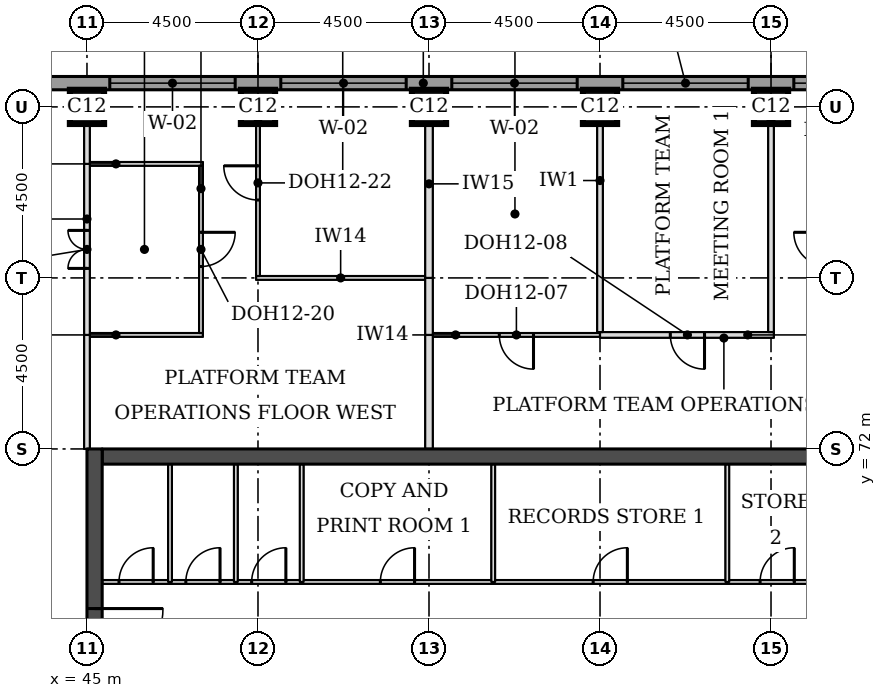
"""IFC4 building model, lengths in metres.
Left out: names, types, materials, properties, quantities, classifications, styles, units other than length and angle.
Written with IfcOpenShell. Run it as: python <this file> out.ifc"""

import sys

from ifc_helpers import new_model, si_unit, direction, frame, frame_2d, origin, origin_2d, place, context, subcontext, project, spatial, rectangle, extrude, element, fill, save


model = new_model("IFC4")
c1 = context("Model", 3, precision=1e-05, world=origin(), true_north=direction((0.0, 1.0)))
c2 = subcontext(c1, "Body", "Model", "MODEL_VIEW")
j1 = project(units=[si_unit("LENGTHUNIT", "METRE"), si_unit("PLANEANGLEUNIT", "RADIAN")], contexts=[c1])
p1 = place(None, origin())
s1 = spatial("IfcSite", under=j1, at=p1, CompositionType="ELEMENT")
p2 = place(p1, origin())
s2 = spatial("IfcBuilding", under=s1, at=p2, CompositionType="ELEMENT")
p3 = place(p2, frame((0.0, 0.0, 245.2)))
s3 = spatial("IfcBuildingStorey", under=s2, at=p3, CompositionType="ELEMENT", Elevation=245.2)
for number, where, z_axis, x_axis in (
    (1, (45.0, 81.0, 0.0), (0.0, 0.0, 1.0), (1.0, 0.0, 0.0)),
    (2, (49.5, 81.0, 0.0), (0.0, 0.0, 1.0), (1.0, 0.0, 0.0)),
    (3, (54.0, 81.0, 0.0), (0.0, 0.0, 1.0), (1.0, 0.0, 0.0)),
    (4, (58.5, 81.0, 0.0), (0.0, 0.0, 1.0), (1.0, 0.0, 0.0)),
    (5, (63.0, 81.0, 0.0), (0.0, 0.0, 1.0), (1.0, 0.0, 0.0)),
):
    element("IfcColumn", number, at=place(p3, frame(where, z_axis=z_axis, x_axis=x_axis)), inside=s3, PredefinedType="COLUMN", context=c2, shape_type="SweptSolid", body=[
        extrude(rectangle(XDim=0.9, YDim=0.9, at=origin_2d()), origin(), (0.0, 0.0, 1.0), 3.7),
    ])
p4 = place(p3, frame((45.4, 71.8, 0.0), z_axis=(0.0, 0.0, 1.0), x_axis=(1.0, 0.0, 0.0)))
e6 = element("IfcWall", 6, at=p4, inside=s3, PredefinedType="SHEAR", context=c2, shape_type="SweptSolid", body=[
    extrude(rectangle(XDim=21.7, YDim=0.4, at=frame_2d((10.85, 0.0))), origin(), (0.0, 0.0, 1.0), 3.7),
])
p5 = place(p3, frame((45.2, 49.5, 0.0), z_axis=(0.0, 0.0, 1.0), x_axis=(0.0, 1.0, 0.0)))
e7 = element("IfcWall", 7, at=p5, inside=s3, PredefinedType="SHEAR", context=c2, shape_type="SweptSolid", body=[
    extrude(rectangle(XDim=22.5, YDim=0.4, at=frame_2d((11.25, 0.0))), origin(), (0.0, 0.0, 1.0), 3.7),
])
p6 = place(p5, frame((4.2, 0.0, 0.0)))
e8 = element("IfcOpeningElement", 8, at=p6, cuts=e7, PredefinedType="OPENING", context=c2, shape_type="SweptSolid", body=[
    extrude(rectangle(XDim=1.8, YDim=2.1, at=frame_2d((0.9, 1.05))), frame((0.0, 0.21, 0.0), z_axis=(0.0, -1.0, 0.0), x_axis=(1.0, 0.0, 0.0)), (0.0, 0.0, 1.0), 0.42),
])
p7 = place(p5, frame((6.9, 0.0, 0.0)))
e9 = element("IfcOpeningElement", 9, at=p7, cuts=e7, PredefinedType="OPENING", context=c2, shape_type="SweptSolid", body=[
    extrude(rectangle(XDim=1.1, YDim=2.1, at=frame_2d((0.55, 1.05))), frame((0.0, 0.21, 0.0), z_axis=(0.0, -1.0, 0.0), x_axis=(1.0, 0.0, 0.0)), (0.0, 0.0, 1.0), 0.42),
])
p8 = place(p5, frame((13.6, 0.0, 0.0)))
e10 = element("IfcOpeningElement", 10, at=p8, cuts=e7, PredefinedType="OPENING", context=c2, shape_type="SweptSolid", body=[
    extrude(rectangle(XDim=1.1, YDim=2.1, at=frame_2d((0.55, 1.05))), frame((0.0, 0.21, 0.0), z_axis=(0.0, -1.0, 0.0), x_axis=(1.0, 0.0, 0.0)), (0.0, 0.0, 1.0), 0.42),
])
p9 = place(p5, frame((16.5, 0.0, 0.0)))
e11 = element("IfcOpeningElement", 11, at=p9, cuts=e7, PredefinedType="OPENING", context=c2, shape_type="SweptSolid", body=[
    extrude(rectangle(XDim=1.8, YDim=2.1, at=frame_2d((0.9, 1.05))), frame((0.0, 0.21, 0.0), z_axis=(0.0, -1.0, 0.0), x_axis=(1.0, 0.0, 0.0)), (0.0, 0.0, 1.0), 0.42),
])
p10 = place(p3, frame((72.331, 81.625, 0.0), z_axis=(0.0, 0.0, 1.0), x_axis=(-1.0, 0.0, 0.0)))
e12 = element("IfcWall", 12, at=p10, inside=s3, PredefinedType="STANDARD", context=c2, shape_type="SweptSolid", body=[
    extrude(rectangle(XDim=32.163, YDim=0.35, at=frame_2d((16.081, 0.0))), origin(), (0.0, 0.0, 1.0), 3.525),
])
p11 = place(p10, frame((5.431, 0.0, 0.9)))
e13 = element("IfcOpeningElement", 13, at=p11, cuts=e12, PredefinedType="OPENING", context=c2, shape_type="SweptSolid", body=[
    extrude(rectangle(XDim=3.3, YDim=1.9, at=frame_2d((1.65, 0.95))), frame((0.0, 0.185, 0.0), z_axis=(0.0, -1.0, 0.0), x_axis=(1.0, 0.0, 0.0)), (0.0, 0.0, 1.0), 0.37),
])
p12 = place(p10, frame((9.931, 0.0, 0.9)))
e14 = element("IfcOpeningElement", 14, at=p12, cuts=e12, PredefinedType="OPENING", context=c2, shape_type="SweptSolid", body=[
    extrude(rectangle(XDim=3.3, YDim=1.9, at=frame_2d((1.65, 0.95))), frame((0.0, 0.185, 0.0), z_axis=(0.0, -1.0, 0.0), x_axis=(1.0, 0.0, 0.0)), (0.0, 0.0, 1.0), 0.37),
])
p13 = place(p10, frame((14.431, 0.0, 0.9)))
e15 = element("IfcOpeningElement", 15, at=p13, cuts=e12, PredefinedType="OPENING", context=c2, shape_type="SweptSolid", body=[
    extrude(rectangle(XDim=3.3, YDim=1.9, at=frame_2d((1.65, 0.95))), frame((0.0, 0.185, 0.0), z_axis=(0.0, -1.0, 0.0), x_axis=(1.0, 0.0, 0.0)), (0.0, 0.0, 1.0), 0.37),
])
p14 = place(p10, frame((18.931, 0.0, 0.9)))
e16 = element("IfcOpeningElement", 16, at=p14, cuts=e12, PredefinedType="OPENING", context=c2, shape_type="SweptSolid", body=[
    extrude(rectangle(XDim=3.3, YDim=1.9, at=frame_2d((1.65, 0.95))), frame((0.0, 0.185, 0.0), z_axis=(0.0, -1.0, 0.0), x_axis=(1.0, 0.0, 0.0)), (0.0, 0.0, 1.0), 0.37),
])
p15 = place(p10, frame((23.431, 0.0, 0.9)))
e17 = element("IfcOpeningElement", 17, at=p15, cuts=e12, PredefinedType="OPENING", context=c2, shape_type="SweptSolid", body=[
    extrude(rectangle(XDim=3.3, YDim=1.9, at=frame_2d((1.65, 0.95))), frame((0.0, 0.185, 0.0), z_axis=(0.0, -1.0, 0.0), x_axis=(1.0, 0.0, 0.0)), (0.0, 0.0, 1.0), 0.37),
])
p16 = place(p3, frame((45.075, 75.0, 0.0), z_axis=(0.0, 0.0, 1.0), x_axis=(1.0, 0.0, 0.0)))
e18 = element("IfcWall", 18, at=p16, inside=s3, PredefinedType="PARTITIONING", context=c2, shape_type="SweptSolid", body=[
    extrude(rectangle(XDim=2.975, YDim=0.1, at=frame_2d((1.488, 0.0))), origin(), (0.0, 0.0, 1.0), 3.55),
])
p17 = place(p3, frame((54.1, 75.0, 0.0), z_axis=(0.0, 0.0, 1.0), x_axis=(1.0, 0.0, 0.0)))
e19 = element("IfcWall", 19, at=p17, inside=s3, PredefinedType="PARTITIONING", context=c2, shape_type="SweptSolid", body=[
    extrude(rectangle(XDim=4.4, YDim=0.1, at=frame_2d((2.2, 0.0))), origin(), (0.0, 0.0, 1.0), 3.55),
])
p18 = place(p17, frame((1.75, 0.0, 0.0)))
e20 = element("IfcOpeningElement", 20, at=p18, cuts=e19, PredefinedType="OPENING", context=c2, shape_type="SweptSolid", body=[
    extrude(rectangle(XDim=0.9, YDim=2.1, at=frame_2d((0.45, 1.05))), frame((0.0, 0.06, 0.0), z_axis=(0.0, -1.0, 0.0), x_axis=(1.0, 0.0, 0.0)), (0.0, 0.0, 1.0), 0.12),
])
p19 = place(p3, frame((58.5, 75.0, 0.0), z_axis=(0.0, 0.0, 1.0), x_axis=(1.0, 0.0, 0.0)))
e21 = element("IfcWall", 21, at=p19, inside=s3, PredefinedType="PARTITIONING", context=c2, shape_type="SweptSolid", body=[
    extrude(rectangle(XDim=4.575, YDim=0.15, at=frame_2d((2.288, 0.0))), origin(), (0.0, 0.0, 1.0), 3.55),
])
p20 = place(p19, frame((1.85, 0.0, 0.0)))
e22 = element("IfcOpeningElement", 22, at=p20, cuts=e21, PredefinedType="OPENING", context=c2, shape_type="SweptSolid", body=[
    extrude(rectangle(XDim=0.9, YDim=2.1, at=frame_2d((0.45, 1.05))), frame((0.0, 0.085, 0.0), z_axis=(0.0, -1.0, 0.0), x_axis=(1.0, 0.0, 0.0)), (0.0, 0.0, 1.0), 0.17),
])
p21 = place(p3, frame((49.45, 76.5, 0.0), z_axis=(0.0, 0.0, 1.0), x_axis=(1.0, 0.0, 0.0)))
e23 = element("IfcWall", 23, at=p21, inside=s3, PredefinedType="PARTITIONING", context=c2, shape_type="SweptSolid", body=[
    extrude(rectangle(XDim=4.45, YDim=0.1, at=frame_2d((2.225, 0.0))), origin(), (0.0, 0.0, 1.0), 3.55),
])
p22 = place(p3, frame((45.075, 79.5, 0.0), z_axis=(0.0, 0.0, 1.0), x_axis=(1.0, 0.0, 0.0)))
e24 = element("IfcWall", 24, at=p22, inside=s3, PredefinedType="PARTITIONING", context=c2, shape_type="SweptSolid", body=[
    extrude(rectangle(XDim=2.975, YDim=0.1, at=frame_2d((1.488, 0.0))), origin(), (0.0, 0.0, 1.0), 3.55),
])
p23 = place(p3, frame((45.0, 72.0, 0.0), z_axis=(0.0, 0.0, 1.0), x_axis=(0.0, 1.0, 0.0)))
e25 = element("IfcWall", 25, at=p23, inside=s3, PredefinedType="PARTITIONING", context=c2, shape_type="SweptSolid", body=[
    extrude(rectangle(XDim=3.0, YDim=0.15, at=frame_2d((1.5, 0.0))), origin(), (0.0, 0.0, 1.0), 3.022),
])
p24 = place(p3, frame((54.0, 72.0, 0.0), z_axis=(0.0, 0.0, 1.0), x_axis=(0.0, 1.0, 0.0)))
e26 = element("IfcWall", 26, at=p24, inside=s3, PredefinedType="PARTITIONING", context=c2, shape_type="SweptSolid", body=[
    extrude(rectangle(XDim=3.0, YDim=0.2, at=frame_2d((1.5, 0.0))), origin(), (0.0, 0.0, 1.0), 3.55),
])
p25 = place(p3, frame((45.0, 75.0, 0.0), z_axis=(0.0, 0.0, 1.0), x_axis=(0.0, 1.0, 0.0)))
e27 = element("IfcWall", 27, at=p25, inside=s3, PredefinedType="PARTITIONING", context=c2, shape_type="SweptSolid", body=[
    extrude(rectangle(XDim=4.5, YDim=0.15, at=frame_2d((2.25, 0.0))), origin(), (0.0, 0.0, 1.0), 3.022),
])
p26 = place(p25, frame((1.75, 0.0, 0.0)))
e28 = element("IfcOpeningElement", 28, at=p26, cuts=e27, PredefinedType="OPENING", context=c2, shape_type="SweptSolid", body=[
    extrude(rectangle(XDim=1.0, YDim=2.1, at=frame_2d((0.5, 1.05))), frame((0.0, 0.085, 0.0), z_axis=(0.0, -1.0, 0.0), x_axis=(1.0, 0.0, 0.0)), (0.0, 0.0, 1.0), 0.17),
])
p27 = place(p3, frame((54.0, 75.0, 0.0), z_axis=(0.0, 0.0, 1.0), x_axis=(0.0, 1.0, 0.0)))
e29 = element("IfcWall", 29, at=p27, inside=s3, PredefinedType="PARTITIONING", context=c2, shape_type="SweptSolid", body=[
    extrude(rectangle(XDim=1.5, YDim=0.2, at=frame_2d((0.75, 0.0))), origin(), (0.0, 0.0, 1.0), 3.55),
])
p28 = place(p3, frame((48.0, 75.05, 0.0), z_axis=(0.0, 0.0, 1.0), x_axis=(0.0, 1.0, 0.0)))
e30 = element("IfcWall", 30, at=p28, inside=s3, PredefinedType="PARTITIONING", context=c2, shape_type="SweptSolid", body=[
    extrude(rectangle(XDim=4.4, YDim=0.1, at=frame_2d((2.2, 0.0))), origin(), (0.0, 0.0, 1.0), 3.55),
])
p29 = place(p28, frame((1.75, 0.0, 0.0)))
e31 = element("IfcOpeningElement", 31, at=p29, cuts=e30, PredefinedType="OPENING", context=c2, shape_type="SweptSolid", body=[
    extrude(rectangle(XDim=0.9, YDim=2.1, at=frame_2d((0.45, 1.05))), frame((0.0, 0.06, 0.0), z_axis=(0.0, -1.0, 0.0), x_axis=(1.0, 0.0, 0.0)), (0.0, 0.0, 1.0), 0.12),
])
for number, where, z_axis, x_axis in (
    (32, (58.5, 75.075, 0.0), (0.0, 0.0, 1.0), (0.0, 1.0, 0.0)),
    (33, (63.0, 75.075, 0.0), (0.0, 0.0, 1.0), (0.0, 1.0, 0.0)),
):
    element("IfcWall", number, at=place(p3, frame(where, z_axis=z_axis, x_axis=x_axis)), inside=s3, PredefinedType="PARTITIONING", context=c2, shape_type="SweptSolid", body=[
        extrude(rectangle(XDim=6.375, YDim=0.15, at=frame_2d((3.188, 0.0))), origin(), (0.0, 0.0, 1.0), 3.55),
    ])
p30 = place(p3, frame((54.0, 76.5, 0.0), z_axis=(0.0, 0.0, 1.0), x_axis=(0.0, 1.0, 0.0)))
e34 = element("IfcWall", 34, at=p30, inside=s3, PredefinedType="PARTITIONING", context=c2, shape_type="SweptSolid", body=[
    extrude(rectangle(XDim=4.95, YDim=0.2, at=frame_2d((2.475, 0.0))), origin(), (0.0, 0.0, 1.0), 3.55),
])
p31 = place(p3, frame((49.5, 76.55, 0.0), z_axis=(0.0, 0.0, 1.0), x_axis=(0.0, 1.0, 0.0)))
e35 = element("IfcWall", 35, at=p31, inside=s3, PredefinedType="PARTITIONING", context=c2, shape_type="SweptSolid", body=[
    extrude(rectangle(XDim=4.9, YDim=0.1, at=frame_2d((2.45, 0.0))), origin(), (0.0, 0.0, 1.0), 3.55),
])
p32 = place(p31, frame((2.0, 0.0, 0.0)))
e36 = element("IfcOpeningElement", 36, at=p32, cuts=e35, PredefinedType="OPENING", context=c2, shape_type="SweptSolid", body=[
    extrude(rectangle(XDim=0.9, YDim=2.1, at=frame_2d((0.45, 1.05))), frame((0.0, 0.06, 0.0), z_axis=(0.0, -1.0, 0.0), x_axis=(1.0, 0.0, 0.0)), (0.0, 0.0, 1.0), 0.12),
])
p33 = place(p3, frame((45.0, 79.5, 0.0), z_axis=(0.0, 0.0, 1.0), x_axis=(0.0, 1.0, 0.0)))
e37 = element("IfcWall", 37, at=p33, inside=s3, PredefinedType="PARTITIONING", context=c2, shape_type="SweptSolid", body=[
    extrude(rectangle(XDim=1.95, YDim=0.15, at=frame_2d((0.975, 0.0))), origin(), (0.0, 0.0, 1.0), 3.022),
])
p34 = place(p3, frame((45.4, 68.5, 0.0), z_axis=(0.0, 0.0, 1.0), x_axis=(1.0, 0.0, 0.0)))
e38 = element("IfcWall", 38, at=p34, inside=s3, PredefinedType="PARTITIONING", context=c2, shape_type="SweptSolid", body=[
    extrude(rectangle(XDim=21.7, YDim=0.1, at=frame_2d((10.85, 0.0))), origin(), (0.0, 0.0, 1.0), 3.55),
])
p35 = place(p34, frame((19.938, 0.0, 0.0)))
e39 = element("IfcOpeningElement", 39, at=p35, cuts=e38, PredefinedType="OPENING", context=c2, shape_type="SweptSolid", body=[
    extrude(rectangle(XDim=0.9, YDim=2.1, at=frame_2d((0.45, 1.05))), frame((0.0, 0.06, 0.0), z_axis=(0.0, -1.0, 0.0), x_axis=(1.0, 0.0, 0.0)), (0.0, 0.0, 1.0), 0.12),
])
p36 = place(p34, frame((17.312, 0.0, 0.0)))
e40 = element("IfcOpeningElement", 40, at=p36, cuts=e38, PredefinedType="OPENING", context=c2, shape_type="SweptSolid", body=[
    extrude(rectangle(XDim=0.9, YDim=2.1, at=frame_2d((0.45, 1.05))), frame((0.0, 0.06, 0.0), z_axis=(0.0, -1.0, 0.0), x_axis=(1.0, 0.0, 0.0)), (0.0, 0.0, 1.0), 0.12),
])
p37 = place(p34, frame((0.442, 0.0, 0.0)))
e41 = element("IfcOpeningElement", 41, at=p37, cuts=e38, PredefinedType="OPENING", context=c2, shape_type="SweptSolid", body=[
    extrude(rectangle(XDim=0.9, YDim=2.1, at=frame_2d((0.45, 1.05))), frame((0.0, 0.06, 0.0), z_axis=(0.0, -1.0, 0.0), x_axis=(1.0, 0.0, 0.0)), (0.0, 0.0, 1.0), 0.12),
])
p38 = place(p34, frame((2.201, 0.0, 0.0)))
e42 = element("IfcOpeningElement", 42, at=p38, cuts=e38, PredefinedType="OPENING", context=c2, shape_type="SweptSolid", body=[
    extrude(rectangle(XDim=0.9, YDim=2.1, at=frame_2d((0.45, 1.05))), frame((0.0, 0.06, 0.0), z_axis=(0.0, -1.0, 0.0), x_axis=(1.0, 0.0, 0.0)), (0.0, 0.0, 1.0), 0.12),
])
p39 = place(p34, frame((3.934, 0.0, 0.0)))
e43 = element("IfcOpeningElement", 43, at=p39, cuts=e38, PredefinedType="OPENING", context=c2, shape_type="SweptSolid", body=[
    extrude(rectangle(XDim=0.9, YDim=2.1, at=frame_2d((0.45, 1.05))), frame((0.0, 0.06, 0.0), z_axis=(0.0, -1.0, 0.0), x_axis=(1.0, 0.0, 0.0)), (0.0, 0.0, 1.0), 0.12),
])
p40 = place(p34, frame((12.92, 0.0, 0.0)))
e44 = element("IfcOpeningElement", 44, at=p40, cuts=e38, PredefinedType="OPENING", context=c2, shape_type="SweptSolid", body=[
    extrude(rectangle(XDim=0.9, YDim=2.1, at=frame_2d((0.45, 1.05))), frame((0.0, 0.06, 0.0), z_axis=(0.0, -1.0, 0.0), x_axis=(1.0, 0.0, 0.0)), (0.0, 0.0, 1.0), 0.12),
])
p41 = place(p34, frame((7.32, 0.0, 0.0)))
e45 = element("IfcOpeningElement", 45, at=p41, cuts=e38, PredefinedType="OPENING", context=c2, shape_type="SweptSolid", body=[
    extrude(rectangle(XDim=0.9, YDim=2.1, at=frame_2d((0.45, 1.05))), frame((0.0, 0.06, 0.0), z_axis=(0.0, -1.0, 0.0), x_axis=(1.0, 0.0, 0.0)), (0.0, 0.0, 1.0), 0.12),
])
for number, where, z_axis, x_axis in (
    (46, (47.185, 68.5, 0.0), (0.0, 0.0, 1.0), (0.0, 1.0, 0.0)),
    (47, (48.917, 68.5, 0.0), (0.0, 0.0, 1.0), (0.0, 1.0, 0.0)),
    (48, (50.65, 68.5, 0.0), (0.0, 0.0, 1.0), (0.0, 1.0, 0.0)),
    (49, (55.69, 68.5, 0.0), (0.0, 0.0, 1.0), (0.0, 1.0, 0.0)),
    (50, (61.85, 68.5, 0.0), (0.0, 0.0, 1.0), (0.0, 1.0, 0.0)),
):
    element("IfcWall", number, at=place(p3, frame(where, z_axis=z_axis, x_axis=x_axis)), inside=s3, PredefinedType="PARTITIONING", context=c2, shape_type="SweptSolid", body=[
        extrude(rectangle(XDim=3.1, YDim=0.1, at=frame_2d((1.55, 0.0))), origin(), (0.0, 0.0, 1.0), 3.55),
    ])
p42 = place(p11, origin())
e51 = element("IfcWindow", 51, at=p42, inside=s3, PartitioningType="SINGLE_PANEL", PredefinedType="WINDOW", context=c2, shape_type="SweptSolid", body=[
    extrude(rectangle(XDim=3.3, YDim=1.9, at=frame_2d((1.65, 0.95))), frame((0.0, 0.085, 0.0), z_axis=(0.0, -1.0, 0.0), x_axis=(1.0, 0.0, 0.0)), (0.0, 0.0, 1.0), 0.06),
])
fill(e13, e51)
p43 = place(p12, origin())
e52 = element("IfcWindow", 52, at=p43, inside=s3, PartitioningType="SINGLE_PANEL", PredefinedType="WINDOW", context=c2, shape_type="SweptSolid", body=[
    extrude(rectangle(XDim=3.3, YDim=1.9, at=frame_2d((1.65, 0.95))), frame((0.0, 0.085, 0.0), z_axis=(0.0, -1.0, 0.0), x_axis=(1.0, 0.0, 0.0)), (0.0, 0.0, 1.0), 0.06),
])
fill(e14, e52)
p44 = place(p13, origin())
e53 = element("IfcWindow", 53, at=p44, inside=s3, PartitioningType="SINGLE_PANEL", PredefinedType="WINDOW", context=c2, shape_type="SweptSolid", body=[
    extrude(rectangle(XDim=3.3, YDim=1.9, at=frame_2d((1.65, 0.95))), frame((0.0, 0.085, 0.0), z_axis=(0.0, -1.0, 0.0), x_axis=(1.0, 0.0, 0.0)), (0.0, 0.0, 1.0), 0.06),
])
fill(e15, e53)
p45 = place(p14, origin())
e54 = element("IfcWindow", 54, at=p45, inside=s3, PartitioningType="SINGLE_PANEL", PredefinedType="WINDOW", context=c2, shape_type="SweptSolid", body=[
    extrude(rectangle(XDim=3.3, YDim=1.9, at=frame_2d((1.65, 0.95))), frame((0.0, 0.085, 0.0), z_axis=(0.0, -1.0, 0.0), x_axis=(1.0, 0.0, 0.0)), (0.0, 0.0, 1.0), 0.06),
])
fill(e16, e54)
p46 = place(p15, origin())
e55 = element("IfcWindow", 55, at=p46, inside=s3, PartitioningType="SINGLE_PANEL", PredefinedType="WINDOW", context=c2, shape_type="SweptSolid", body=[
    extrude(rectangle(XDim=3.3, YDim=1.9, at=frame_2d((1.65, 0.95))), frame((0.0, 0.085, 0.0), z_axis=(0.0, -1.0, 0.0), x_axis=(1.0, 0.0, 0.0)), (0.0, 0.0, 1.0), 0.06),
])
fill(e17, e55)
p47 = place(p26, origin())
e56 = element("IfcDoor", 56, at=p47, inside=s3, OperationType="DOUBLE_DOOR_SINGLE_SWING", PredefinedType="DOOR", context=c2, shape_type="SweptSolid", body=[
    extrude(rectangle(XDim=1.0, YDim=2.1, at=frame_2d((0.5, 1.05))), frame((0.0, 0.025, 0.0), z_axis=(0.0, -1.0, 0.0), x_axis=(1.0, 0.0, 0.0)), (0.0, 0.0, 1.0), 0.05),
])
fill(e28, e56)
p48 = place(p29, frame((0.9, 0.0, 0.0), z_axis=(0.0, 0.0, 1.0), x_axis=(-1.0, 0.0, 0.0)))
e57 = element("IfcDoor", 57, at=p48, inside=s3, OperationType="SINGLE_SWING_LEFT", PredefinedType="DOOR", context=c2, shape_type="SweptSolid", body=[
    extrude(rectangle(XDim=0.9, YDim=2.1, at=frame_2d((0.45, 1.05))), frame((0.0, 0.025, 0.0), z_axis=(0.0, -1.0, 0.0), x_axis=(1.0, 0.0, 0.0)), (0.0, 0.0, 1.0), 0.05),
])
fill(e31, e57)
p49 = place(p32, origin())
e58 = element("IfcDoor", 58, at=p49, inside=s3, OperationType="SINGLE_SWING_RIGHT", PredefinedType="DOOR", context=c2, shape_type="SweptSolid", body=[
    extrude(rectangle(XDim=0.9, YDim=2.1, at=frame_2d((0.45, 1.05))), frame((0.0, 0.025, 0.0), z_axis=(0.0, -1.0, 0.0), x_axis=(1.0, 0.0, 0.0)), (0.0, 0.0, 1.0), 0.05),
])
fill(e36, e58)
p50 = place(p18, frame((0.9, 0.0, 0.0), z_axis=(0.0, 0.0, 1.0), x_axis=(-1.0, 0.0, 0.0)))
e59 = element("IfcDoor", 59, at=p50, inside=s3, OperationType="SINGLE_SWING_LEFT", PredefinedType="DOOR", context=c2, shape_type="SweptSolid", body=[
    extrude(rectangle(XDim=0.9, YDim=2.1, at=frame_2d((0.45, 1.05))), frame((0.0, 0.025, 0.0), z_axis=(0.0, -1.0, 0.0), x_axis=(1.0, 0.0, 0.0)), (0.0, 0.0, 1.0), 0.05),
])
fill(e20, e59)
p51 = place(p20, frame((0.9, 0.0, 0.0), z_axis=(0.0, 0.0, 1.0), x_axis=(-1.0, 0.0, 0.0)))
e60 = element("IfcDoor", 60, at=p51, inside=s3, OperationType="SINGLE_SWING_LEFT", PredefinedType="DOOR", context=c2, shape_type="SweptSolid", body=[
    extrude(rectangle(XDim=0.9, YDim=2.1, at=frame_2d((0.45, 1.05))), frame((0.0, 0.025, 0.0), z_axis=(0.0, -1.0, 0.0), x_axis=(1.0, 0.0, 0.0)), (0.0, 0.0, 1.0), 0.05),
])
fill(e22, e60)
p52 = place(p9, frame((1.8, 0.0, 0.0), z_axis=(0.0, 0.0, 1.0), x_axis=(-1.0, 0.0, 0.0)))
e61 = element("IfcDoor", 61, at=p52, inside=s3, OperationType="SINGLE_SWING_LEFT", PredefinedType="DOOR", context=c2, shape_type="SweptSolid", body=[
    extrude(rectangle(XDim=1.8, YDim=2.1, at=frame_2d((0.9, 1.05))), frame((0.0, 0.025, 0.0), z_axis=(0.0, -1.0, 0.0), x_axis=(1.0, 0.0, 0.0)), (0.0, 0.0, 1.0), 0.05),
])
fill(e11, e61)
p53 = place(p36, origin())
e62 = element("IfcDoor", 62, at=p53, inside=s3, OperationType="SINGLE_SWING_RIGHT", PredefinedType="DOOR", context=c2, shape_type="SweptSolid", body=[
    extrude(rectangle(XDim=0.9, YDim=2.1, at=frame_2d((0.45, 1.05))), frame((0.0, 0.025, 0.0), z_axis=(0.0, -1.0, 0.0), x_axis=(1.0, 0.0, 0.0)), (0.0, 0.0, 1.0), 0.05),
])
fill(e40, e62)
p54 = place(p37, origin())
e63 = element("IfcDoor", 63, at=p54, inside=s3, OperationType="SINGLE_SWING_RIGHT", PredefinedType="DOOR", context=c2, shape_type="SweptSolid", body=[
    extrude(rectangle(XDim=0.9, YDim=2.1, at=frame_2d((0.45, 1.05))), frame((0.0, 0.025, 0.0), z_axis=(0.0, -1.0, 0.0), x_axis=(1.0, 0.0, 0.0)), (0.0, 0.0, 1.0), 0.05),
])
fill(e41, e63)
p55 = place(p38, origin())
e64 = element("IfcDoor", 64, at=p55, inside=s3, OperationType="SINGLE_SWING_RIGHT", PredefinedType="DOOR", context=c2, shape_type="SweptSolid", body=[
    extrude(rectangle(XDim=0.9, YDim=2.1, at=frame_2d((0.45, 1.05))), frame((0.0, 0.025, 0.0), z_axis=(0.0, -1.0, 0.0), x_axis=(1.0, 0.0, 0.0)), (0.0, 0.0, 1.0), 0.05),
])
fill(e42, e64)
p56 = place(p39, origin())
e65 = element("IfcDoor", 65, at=p56, inside=s3, OperationType="SINGLE_SWING_RIGHT", PredefinedType="DOOR", context=c2, shape_type="SweptSolid", body=[
    extrude(rectangle(XDim=0.9, YDim=2.1, at=frame_2d((0.45, 1.05))), frame((0.0, 0.025, 0.0), z_axis=(0.0, -1.0, 0.0), x_axis=(1.0, 0.0, 0.0)), (0.0, 0.0, 1.0), 0.05),
])
fill(e43, e65)
p57 = place(p40, origin())
e66 = element("IfcDoor", 66, at=p57, inside=s3, OperationType="SINGLE_SWING_RIGHT", PredefinedType="DOOR", context=c2, shape_type="SweptSolid", body=[
    extrude(rectangle(XDim=0.9, YDim=2.1, at=frame_2d((0.45, 1.05))), frame((0.0, 0.025, 0.0), z_axis=(0.0, -1.0, 0.0), x_axis=(1.0, 0.0, 0.0)), (0.0, 0.0, 1.0), 0.05),
])
fill(e44, e66)
p58 = place(p41, origin())
e67 = element("IfcDoor", 67, at=p58, inside=s3, OperationType="SINGLE_SWING_RIGHT", PredefinedType="DOOR", context=c2, shape_type="SweptSolid", body=[
    extrude(rectangle(XDim=0.9, YDim=2.1, at=frame_2d((0.45, 1.05))), frame((0.0, 0.025, 0.0), z_axis=(0.0, -1.0, 0.0), x_axis=(1.0, 0.0, 0.0)), (0.0, 0.0, 1.0), 0.05),
])
fill(e45, e67)
save(model, sys.argv[1])
